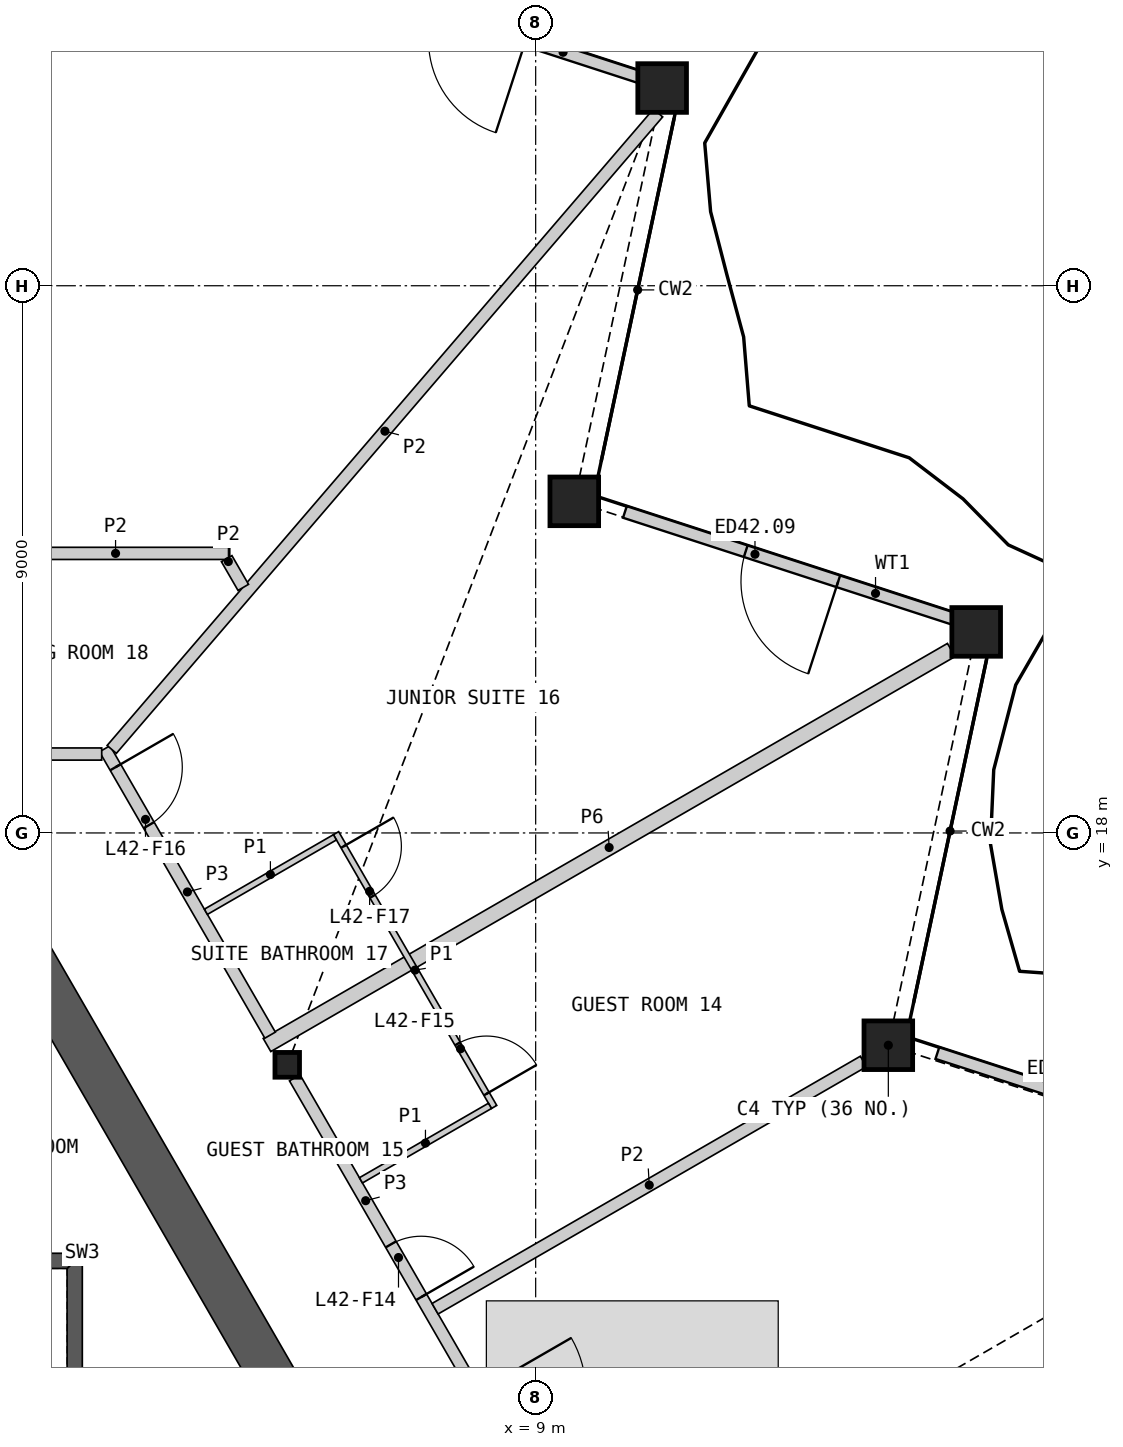
"""IFC4 building model, lengths in metres.
Left out: names, types, materials, properties, quantities, classifications, styles, units other than length and angle.
Written with IfcOpenShell. Run it as: python <this file> out.ifc"""

import sys

from ifc_helpers import new_model, si_unit, direction, frame, frame_2d, origin, origin_2d, place, context, subcontext, project, spatial, polyline, rectangle, hollow_rectangle, i_section, outline, extrude, element, fill, save


model = new_model("IFC4")
c1 = context("Model", 3, precision=1e-05, world=origin(), true_north=direction((0.0, 1.0)))
c2 = subcontext(c1, "Body", "Model", "MODEL_VIEW")
j1 = project(units=[si_unit("LENGTHUNIT", "METRE"), si_unit("PLANEANGLEUNIT", "RADIAN")], contexts=[c1])
p1 = place(None, origin())
s1 = spatial("IfcSite", under=j1, at=p1, CompositionType="ELEMENT")
p2 = place(p1, origin())
s2 = spatial("IfcBuilding", under=s1, at=p2, CompositionType="ELEMENT")
p3 = place(p2, frame((0.0, 0.0, 194.4)))
s3 = spatial("IfcBuildingStorey", under=s2, at=p3, CompositionType="ELEMENT", Elevation=194.4)
for number, where, z_axis, x_axis in (
    (1, (14.8, 14.508, 0.0), (0.0, 0.0, 1.0), (1.0, 0.0, 0.0)),
    (2, (16.245, 21.306, 0.0), (0.0, 0.0, 1.0), (1.0, 0.0, 0.0)),
    (3, (9.635, 23.454, 0.0), (0.0, 0.0, 1.0), (1.0, 0.0, 0.0)),
    (4, (11.08, 30.252, 0.0), (0.0, 0.0, 1.0), (1.0, 0.0, 0.0)),
):
    element("IfcColumn", number, at=place(p3, frame(where, z_axis=z_axis, x_axis=x_axis)), inside=s3, PredefinedType="COLUMN", context=c2, shape_type="SweptSolid", body=[
        extrude(hollow_rectangle(XDim=0.8, YDim=0.8, WallThickness=0.05, at=origin_2d()), origin(), (0.0, 0.0, 1.0), 3.6),
    ])
p4 = place(p3, frame((4.914, 14.186, 0.0), z_axis=(0.0, 0.0, 1.0), x_axis=(1.0, 0.0, 0.0)))
e5 = element("IfcColumn", 5, at=p4, inside=s3, PredefinedType="COLUMN", context=c2, shape_type="SweptSolid", body=[
    extrude(i_section(OverallWidth=0.404, OverallDepth=0.407, WebThickness=0.027, FlangeThickness=0.044, at=origin_2d()), origin(), (0.0, 0.0, 1.0), 3.6),
])
p5 = place(p3, frame((21.102, 12.593, 0.0), z_axis=(0.0, 0.0, 1.0), x_axis=(-0.951059834965, 0.309006780371, 0.0)))
e6 = element("IfcWall", 6, at=p5, inside=s3, PredefinedType="SOLIDWALL", context=c2, shape_type="SweptSolid", body=[
    extrude(rectangle(XDim=5.779, YDim=0.2, at=frame_2d((2.889, 0.0))), origin(), (0.0, 0.0, 1.0), 2.701),
])
p6 = place(p5, frame((2.089, 0.0, 0.0)))
e7 = element("IfcOpeningElement", 7, at=p6, cuts=e6, PredefinedType="OPENING", context=c2, shape_type="SweptSolid", body=[
    extrude(rectangle(XDim=1.6, YDim=2.4, at=frame_2d((0.8, 1.2))), frame((0.0, 0.11, 0.0), z_axis=(0.0, -1.0, 0.0), x_axis=(1.0, 0.0, 0.0)), (0.0, 0.0, 1.0), 0.22),
])
p7 = place(p3, frame((15.963, 21.493, 0.0), z_axis=(0.0, 0.0, 1.0), x_axis=(-0.951059834965, 0.309006780371, 0.0)))
e8 = element("IfcWall", 8, at=p7, inside=s3, PredefinedType="SOLIDWALL", context=c2, shape_type="SweptSolid", body=[
    extrude(rectangle(XDim=5.779, YDim=0.2, at=frame_2d((2.889, 0.0))), origin(), (0.0, 0.0, 1.0), 2.701),
])
p8 = place(p7, frame((2.089, 0.0, 0.0)))
e9 = element("IfcOpeningElement", 9, at=p8, cuts=e8, PredefinedType="OPENING", context=c2, shape_type="SweptSolid", body=[
    extrude(rectangle(XDim=1.6, YDim=2.4, at=frame_2d((0.8, 1.2))), frame((0.0, 0.11, 0.0), z_axis=(0.0, -1.0, 0.0), x_axis=(1.0, 0.0, 0.0)), (0.0, 0.0, 1.0), 0.22),
])
p9 = place(p3, frame((10.825, 30.394, 0.0), z_axis=(0.0, 0.0, 1.0), x_axis=(-0.9510558006, 0.30901919705, 0.0)))
e10 = element("IfcWall", 10, at=p9, inside=s3, PredefinedType="SOLIDWALL", context=c2, shape_type="SweptSolid", body=[
    extrude(rectangle(XDim=5.778, YDim=0.2, at=frame_2d((2.889, 0.0))), origin(), (0.0, 0.0, 1.0), 2.701),
])
p10 = place(p9, frame((2.089, 0.0, 0.0)))
e11 = element("IfcOpeningElement", 11, at=p10, cuts=e10, PredefinedType="OPENING", context=c2, shape_type="SweptSolid", body=[
    extrude(rectangle(XDim=1.6, YDim=2.4, at=frame_2d((0.8, 1.2))), frame((0.0, 0.11, 0.0), z_axis=(0.0, -1.0, 0.0), x_axis=(1.0, 0.0, 0.0)), (0.0, 0.0, 1.0), 0.22),
])
p11 = place(p3, origin())
e12 = element("IfcWall", 12, at=p11, inside=s3, PredefinedType="SHEAR", context=c2, shape_type="SweptSolid", body=[
    extrude(outline(polyline([(1.544, 5.237), (1.544, 11.087), (1.294, 10.837), (1.294, 5.237), (1.544, 5.237)])), origin(), (0.0, 0.0, 1.0), 3.25),
])
p12 = place(p3, origin())
e13 = element("IfcWall", 13, at=p12, inside=s3, PredefinedType="SHEAR", context=c2, shape_type="SweptSolid", body=[
    extrude(outline(polyline([(1.544, 11.087), (-1.544, 11.087), (-1.294, 10.837), (1.294, 10.837), (1.544, 11.087)])), origin(), (0.0, 0.0, 1.0), 3.25),
])
p13 = place(p3, frame((6.875, 5.24, 0.0), z_axis=(0.0, 0.0, 1.0), x_axis=(-0.499997217876, 0.866027010039, 0.0)))
e14 = element("IfcWall", 14, at=p13, inside=s3, PredefinedType="SHEAR", context=c2, shape_type="SweptSolid", body=[
    extrude(rectangle(XDim=13.101, YDim=0.75, at=frame_2d((6.551, 0.0))), origin(), (0.0, 0.0, 1.0), 3.25),
])
p14 = place(p3, frame((4.582, 14.512, 0.0), z_axis=(0.0, 0.0, 1.0), x_axis=(0.866027263711, 0.4999967785, 0.0)))
e15 = element("IfcWall", 15, at=p14, inside=s3, PredefinedType="PARTITIONING", context=c2, shape_type="SweptSolid", body=[
    extrude(rectangle(XDim=12.994, YDim=0.25, at=frame_2d((6.497, 0.0))), origin(), (0.0, 0.0, 1.0), 2.404),
])
p15 = place(p3, frame((5.038, 13.972, 0.0), z_axis=(0.0, 0.0, 1.0), x_axis=(0.50000393355, -0.866023132736, 0.0)))
e16 = element("IfcWall", 16, at=p15, inside=s3, PredefinedType="PARTITIONING", context=c2, shape_type="SweptSolid", body=[
    extrude(rectangle(XDim=9.335, YDim=0.2, at=frame_2d((4.667, 0.0))), origin(), (0.0, 0.0, 1.0), 3.25),
])
p16 = place(p15, frame((5.979, 0.0, 0.0)))
e17 = element("IfcOpeningElement", 17, at=p16, cuts=e16, PredefinedType="OPENING", context=c2, shape_type="SweptSolid", body=[
    extrude(rectangle(XDim=1.8, YDim=2.1, at=frame_2d((0.9, 1.05))), frame((0.0, 0.11, 0.0), z_axis=(0.0, -1.0, 0.0), x_axis=(1.0, 0.0, 0.0)), (0.0, 0.0, 1.0), 0.22),
])
p17 = place(p15, frame((3.163, 0.0, 0.0)))
e18 = element("IfcOpeningElement", 18, at=p17, cuts=e16, PredefinedType="OPENING", context=c2, shape_type="SweptSolid", body=[
    extrude(rectangle(XDim=1.0, YDim=2.1, at=frame_2d((0.5, 1.05))), frame((0.0, 0.11, 0.0), z_axis=(0.0, -1.0, 0.0), x_axis=(1.0, 0.0, 0.0)), (0.0, 0.0, 1.0), 0.22),
])
p18 = place(p3, frame((1.913, 19.385, 0.0), z_axis=(0.0, 0.0, 1.0), x_axis=(0.499972435384, -0.866041317638, 0.0)))
e19 = element("IfcWall", 19, at=p18, inside=s3, PredefinedType="PARTITIONING", context=c2, shape_type="SweptSolid", body=[
    extrude(rectangle(XDim=5.439, YDim=0.2, at=frame_2d((2.719, 0.0))), origin(), (0.0, 0.0, 1.0), 3.25),
])
p19 = place(p18, frame((0.351, 0.0, 0.0)))
e20 = element("IfcOpeningElement", 20, at=p19, cuts=e19, PredefinedType="OPENING", context=c2, shape_type="SweptSolid", body=[
    extrude(rectangle(XDim=1.1, YDim=2.1, at=frame_2d((0.55, 1.05))), frame((0.0, 0.11, 0.0), z_axis=(0.0, -1.0, 0.0), x_axis=(1.0, 0.0, 0.0)), (0.0, 0.0, 1.0), 0.22),
])
p20 = place(p3, frame((-1.963, 19.298, 0.0), z_axis=(0.0, 0.0, 1.0), x_axis=(1.0, 0.0, 0.0)))
e21 = element("IfcWall", 21, at=p20, inside=s3, PredefinedType="PARTITIONING", context=c2, shape_type="SweptSolid", body=[
    extrude(rectangle(XDim=3.826, YDim=0.2, at=frame_2d((1.913, 0.0))), origin(), (0.0, 0.0, 1.0), 3.25),
])
p21 = place(p20, frame((1.49, 0.0, 0.0)))
e22 = element("IfcOpeningElement", 22, at=p21, cuts=e21, PredefinedType="OPENING", context=c2, shape_type="SweptSolid", body=[
    extrude(rectangle(XDim=0.95, YDim=2.1, at=frame_2d((0.475, 1.05))), frame((0.0, 0.11, 0.0), z_axis=(0.0, -1.0, 0.0), x_axis=(1.0, 0.0, 0.0)), (0.0, 0.0, 1.0), 0.22),
])
p22 = place(p3, frame((2.028, 19.374, 0.0), z_axis=(0.0, 0.0, 1.0), x_axis=(0.651304244859, 0.758816697647, 0.0)))
e23 = element("IfcWall", 23, at=p22, inside=s3, PredefinedType="PARTITIONING", context=c2, shape_type="SweptSolid", body=[
    extrude(rectangle(XDim=13.795, YDim=0.2, at=frame_2d((6.897, 0.0))), origin(), (0.0, 0.0, 1.0), 2.404),
])
p23 = place(p3, frame((7.346, 10.175, 0.0), z_axis=(0.0, 0.0, 1.0), x_axis=(0.86602913801, 0.499993532075, 0.0)))
e24 = element("IfcWall", 24, at=p23, inside=s3, PredefinedType="PARTITIONING", context=c2, shape_type="SweptSolid", body=[
    extrude(rectangle(XDim=8.134, YDim=0.2, at=frame_2d((4.067, 0.0))), origin(), (0.0, 0.0, 1.0), 2.404),
])
p24 = place(p3, frame((0.214, 22.598, 0.0), z_axis=(0.0, 0.0, 1.0), x_axis=(1.0, 0.0, 0.0)))
e25 = element("IfcWall", 25, at=p24, inside=s3, PredefinedType="PARTITIONING", context=c2, shape_type="SweptSolid", body=[
    extrude(rectangle(XDim=3.755, YDim=0.2, at=frame_2d((1.877, 0.0))), origin(), (0.0, 0.0, 1.0), 2.404),
])
p25 = place(p3, frame((3.918, 22.511, 0.0), z_axis=(0.0, 0.0, 1.0), x_axis=(0.500083826171, -0.865977001312, 0.0)))
e26 = element("IfcWall", 26, at=p25, inside=s3, PredefinedType="PARTITIONING", context=c2, shape_type="SweptSolid", body=[
    extrude(rectangle(XDim=0.546, YDim=0.2, at=frame_2d((0.273, 0.0))), origin(), (0.0, 0.0, 1.0), 2.404),
])
p26 = place(p3, frame((5.717, 17.996, 0.0), z_axis=(0.0, 0.0, 1.0), x_axis=(0.500027264788, -0.866009661879, 0.0)))
e27 = element("IfcWall", 27, at=p26, inside=s3, PredefinedType="PARTITIONING", context=c2, shape_type="SweptSolid", body=[
    extrude(rectangle(XDim=5.2, YDim=0.1, at=frame_2d((2.6, 0.0))), origin(), (0.0, 0.0, 1.0), 2.404),
])
p27 = place(p26, frame((4.0, 0.0, 0.0)))
e28 = element("IfcOpeningElement", 28, at=p27, cuts=e27, PredefinedType="OPENING", context=c2, shape_type="SweptSolid", body=[
    extrude(rectangle(XDim=0.95, YDim=2.1, at=frame_2d((0.475, 1.05))), frame((0.0, 0.06, 0.0), z_axis=(0.0, -1.0, 0.0), x_axis=(1.0, 0.0, 0.0)), (0.0, 0.0, 1.0), 0.12),
])
p28 = place(p26, frame((0.25, 0.0, 0.0)))
e29 = element("IfcOpeningElement", 29, at=p28, cuts=e27, PredefinedType="OPENING", context=c2, shape_type="SweptSolid", body=[
    extrude(rectangle(XDim=0.95, YDim=2.1, at=frame_2d((0.475, 1.05))), frame((0.0, 0.06, 0.0), z_axis=(0.0, -1.0, 0.0), x_axis=(1.0, 0.0, 0.0)), (0.0, 0.0, 1.0), 0.12),
])
p29 = place(p3, frame((3.576, 16.703, 0.0), z_axis=(0.0, 0.0, 1.0), x_axis=(0.866057815567, 0.499943856944, 0.0)))
e30 = element("IfcWall", 30, at=p29, inside=s3, PredefinedType="PARTITIONING", context=c2, shape_type="SweptSolid", body=[
    extrude(rectangle(XDim=2.45, YDim=0.1, at=frame_2d((1.225, 0.0))), origin(), (0.0, 0.0, 1.0), 2.404),
])
p30 = place(p3, frame((6.126, 12.286, 0.0), z_axis=(0.0, 0.0, 1.0), x_axis=(0.866014668023, 0.500018594424, 0.0)))
e31 = element("IfcWall", 31, at=p30, inside=s3, PredefinedType="PARTITIONING", context=c2, shape_type="SweptSolid", body=[
    extrude(rectangle(XDim=2.45, YDim=0.1, at=frame_2d((1.225, 0.0))), origin(), (0.0, 0.0, 1.0), 2.404),
])
p31 = place(p8, origin())
e32 = element("IfcDoor", 32, at=p31, inside=s3, OperationType="DOUBLE_DOOR_SINGLE_SWING", PredefinedType="DOOR", context=c2, shape_type="SweptSolid", body=[
    extrude(rectangle(XDim=1.6, YDim=2.4, at=frame_2d((0.8, 1.2))), frame((0.0, 0.025, 0.0), z_axis=(0.0, -1.0, 0.0), x_axis=(1.0, 0.0, 0.0)), (0.0, 0.0, 1.0), 0.05),
])
fill(e9, e32)
p32 = place(p17, origin())
e33 = element("IfcDoor", 33, at=p32, inside=s3, OperationType="SINGLE_SWING_RIGHT", PredefinedType="DOOR", context=c2, shape_type="SweptSolid", body=[
    extrude(rectangle(XDim=1.0, YDim=2.1, at=frame_2d((0.5, 1.05))), frame((0.0, 0.025, 0.0), z_axis=(0.0, -1.0, 0.0), x_axis=(1.0, 0.0, 0.0)), (0.0, 0.0, 1.0), 0.05),
])
fill(e18, e33)
p33 = place(p27, origin())
e34 = element("IfcDoor", 34, at=p33, inside=s3, OperationType="SINGLE_SWING_RIGHT", PredefinedType="DOOR", context=c2, shape_type="SweptSolid", body=[
    extrude(rectangle(XDim=0.95, YDim=2.1, at=frame_2d((0.475, 1.05))), frame((0.0, 0.025, 0.0), z_axis=(0.0, -1.0, 0.0), x_axis=(1.0, 0.0, 0.0)), (0.0, 0.0, 1.0), 0.05),
])
fill(e28, e34)
p34 = place(p19, origin())
e35 = element("IfcDoor", 35, at=p34, inside=s3, OperationType="SINGLE_SWING_LEFT", PredefinedType="DOOR", context=c2, shape_type="SweptSolid", body=[
    extrude(rectangle(XDim=1.1, YDim=2.1, at=frame_2d((0.55, 1.05))), frame((0.0, 0.025, 0.0), z_axis=(0.0, -1.0, 0.0), x_axis=(1.0, 0.0, 0.0)), (0.0, 0.0, 1.0), 0.05),
])
fill(e20, e35)
p35 = place(p28, origin())
e36 = element("IfcDoor", 36, at=p35, inside=s3, OperationType="SINGLE_SWING_LEFT", PredefinedType="DOOR", context=c2, shape_type="SweptSolid", body=[
    extrude(rectangle(XDim=0.95, YDim=2.1, at=frame_2d((0.475, 1.05))), frame((0.0, 0.025, 0.0), z_axis=(0.0, -1.0, 0.0), x_axis=(1.0, 0.0, 0.0)), (0.0, 0.0, 1.0), 0.05),
])
fill(e29, e36)
save(model, sys.argv[1])
